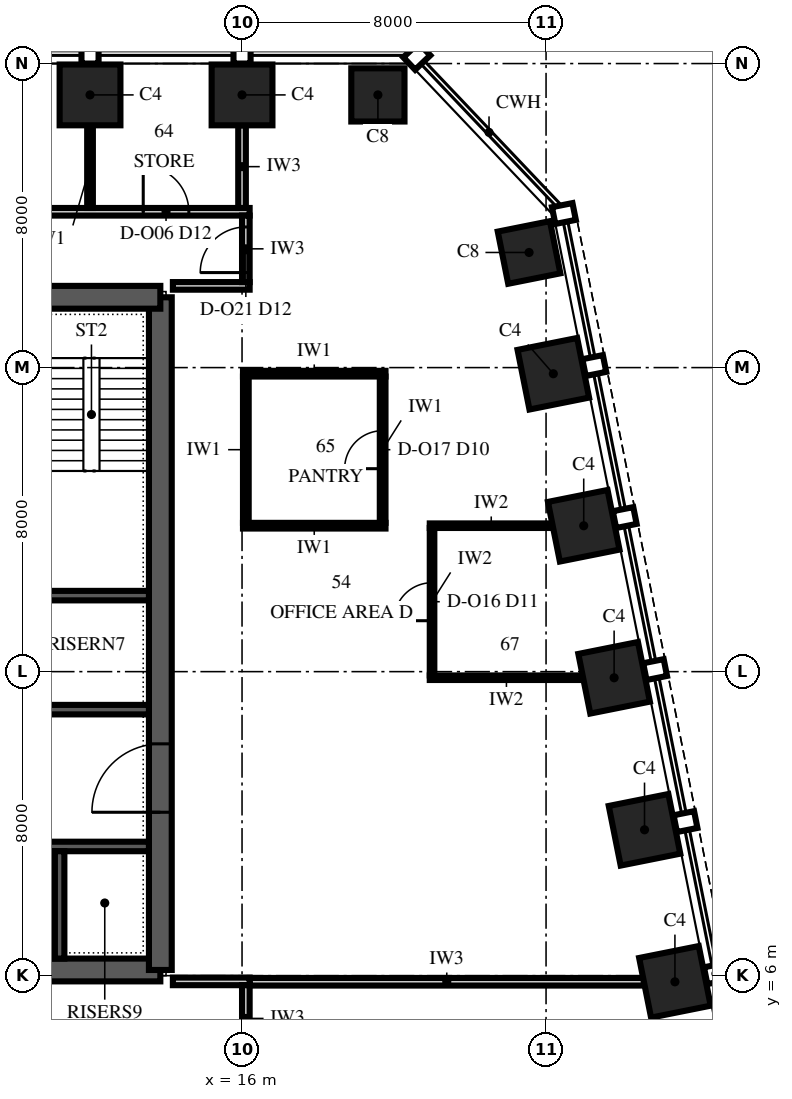
"""IFC4 building model, lengths in metres.
Left out: names, types, materials, properties, quantities, classifications, styles, units other than length and angle.
Written with IfcOpenShell. Run it as: python <this file> out.ifc"""

import sys

from ifc_helpers import new_model, si_unit, direction, frame, frame_2d, origin, origin_2d, place, context, subcontext, project, spatial, polyline, rectangle, outline, extrude, element, fill, save


model = new_model("IFC4")
c1 = context("Model", 3, precision=1e-05, world=origin(), true_north=direction((0.0, 1.0)))
c2 = subcontext(c1, "Body", "Model", "MODEL_VIEW")
j1 = project(units=[si_unit("LENGTHUNIT", "METRE"), si_unit("PLANEANGLEUNIT", "RADIAN")], contexts=[c1])
p1 = place(None, origin())
s1 = spatial("IfcSite", under=j1, at=p1, CompositionType="ELEMENT")
p2 = place(p1, origin())
s2 = spatial("IfcBuilding", under=s1, at=p2, CompositionType="ELEMENT")
p3 = place(p2, frame((0.0, 0.0, 226.0)))
s3 = spatial("IfcBuildingStorey", under=s2, at=p3, CompositionType="ELEMENT", Elevation=226.0)
for number, where, z_axis, x_axis in (
    (1, (27.391, 5.838, 0.0), (0.0, 0.0, 1.0), (-0.196, 0.981, 0.0)),
    (2, (26.591, 9.838, 0.0), (0.0, 0.0, 1.0), (-0.196, 0.981, 0.0)),
    (3, (25.791, 13.838, 0.0), (0.0, 0.0, 1.0), (-0.196, 0.981, 0.0)),
    (4, (24.991, 17.838, 0.0), (0.0, 0.0, 1.0), (-0.196, 0.981, 0.0)),
    (5, (24.191, 21.838, 0.0), (0.0, 0.0, 1.0), (-0.196, 0.981, 0.0)),
):
    element("IfcColumn", number, at=place(p3, frame(where, z_axis=z_axis, x_axis=x_axis)), inside=s3, PredefinedType="COLUMN", context=c2, shape_type="SweptSolid", body=[
        extrude(rectangle(XDim=1.6, YDim=1.6, at=origin_2d()), origin(), (0.0, 0.0, 1.0), 4.0),
    ])
for number, where, z_axis, x_axis in (
    (6, (23.553, 25.029, 0.0), (0.0, 0.0, 1.0), (-0.196, 0.981, 0.0)),
    (7, (19.575, 29.175, 0.0), (0.0, 0.0, 1.0), (-1.0, 0.0, 0.0)),
):
    element("IfcColumn", number, at=place(p3, frame(where, z_axis=z_axis, x_axis=x_axis)), inside=s3, PredefinedType="COLUMN", context=c2, shape_type="SweptSolid", body=[
        extrude(rectangle(XDim=1.4, YDim=1.4, at=origin_2d()), origin(), (0.0, 0.0, 1.0), 4.0),
    ])
for number, where, z_axis, x_axis in (
    (8, (16.0, 29.175, 0.0), (0.0, 0.0, 1.0), (-1.0, 0.0, 0.0)),
    (9, (12.0, 29.175, 0.0), (0.0, 0.0, 1.0), (-1.0, 0.0, 0.0)),
):
    element("IfcColumn", number, at=place(p3, frame(where, z_axis=z_axis, x_axis=x_axis)), inside=s3, PredefinedType="COLUMN", context=c2, shape_type="SweptSolid", body=[
        extrude(rectangle(XDim=1.6, YDim=1.6, at=origin_2d()), origin(), (0.0, 0.0, 1.0), 4.0),
    ])
p4 = place(p3, frame((-13.85, 6.15, 0.0), z_axis=(0.0, 0.0, 1.0), x_axis=(1.0, 0.0, 0.0)))
e10 = element("IfcWall", 10, at=p4, inside=s3, PredefinedType="SHEAR", context=c2, shape_type="SweptSolid", body=[
    extrude(rectangle(XDim=27.7, YDim=0.6, at=frame_2d((13.85, 0.0))), origin(), (0.0, 0.0, 1.0), 4.0),
])
p5 = place(p3, frame((13.85, 6.15, 0.0), z_axis=(0.0, 0.0, 1.0), x_axis=(0.0, 1.0, 0.0)))
e11 = element("IfcWall", 11, at=p5, inside=s3, PredefinedType="SHEAR", context=c2, shape_type="SweptSolid", body=[
    extrude(outline(polyline([(0.0, -0.3), (17.7, -0.3), (17.7, 0.0), (17.4, 0.0), (17.4, 0.3), (0.3, 0.3), (0.3, 0.0), (0.0, 0.0), (0.0, -0.3)])), origin(), (0.0, 0.0, 1.0), 4.0),
])
p6 = place(p5, frame((4.15, 0.0, 0.0)))
e12 = element("IfcOpeningElement", 12, at=p6, cuts=e11, PredefinedType="OPENING", context=c2, shape_type="SweptSolid", body=[
    extrude(rectangle(XDim=1.8, YDim=2.4, at=frame_2d((0.9, 1.2))), frame((0.0, 0.315, 0.0), z_axis=(0.0, -1.0, 0.0), x_axis=(1.0, 0.0, 0.0)), (0.0, 0.0, 1.0), 0.63),
])
p7 = place(p3, frame((13.85, 23.85, 0.0), z_axis=(0.0, 0.0, 1.0), x_axis=(-1.0, 0.0, 0.0)))
e13 = element("IfcWall", 13, at=p7, inside=s3, PredefinedType="SHEAR", context=c2, shape_type="SweptSolid", body=[
    extrude(rectangle(XDim=27.7, YDim=0.6, at=frame_2d((13.85, 0.0))), origin(), (0.0, 0.0, 1.0), 4.0),
])
p8 = place(p7, frame((21.75, 0.0, 0.0)))
e14 = element("IfcOpeningElement", 14, at=p8, cuts=e13, PredefinedType="OPENING", context=c2, shape_type="SweptSolid", body=[
    extrude(rectangle(XDim=1.0, YDim=2.1, at=frame_2d((0.5, 1.05))), frame((0.0, 0.315, 0.0), z_axis=(0.0, -1.0, 0.0), x_axis=(1.0, 0.0, 0.0)), (0.0, 0.0, 1.0), 0.63),
])
p9 = place(p7, frame((4.95, 0.0, 0.0)))
e15 = element("IfcOpeningElement", 15, at=p9, cuts=e13, PredefinedType="OPENING", context=c2, shape_type="SweptSolid", body=[
    extrude(rectangle(XDim=1.0, YDim=2.1, at=frame_2d((0.5, 1.05))), frame((0.0, 0.315, 0.0), z_axis=(0.0, -1.0, 0.0), x_axis=(1.0, 0.0, 0.0)), (0.0, 0.0, 1.0), 0.63),
])
p10 = place(p7, frame((17.35, 0.0, 0.0)))
e16 = element("IfcOpeningElement", 16, at=p10, cuts=e13, PredefinedType="OPENING", context=c2, shape_type="SweptSolid", body=[
    extrude(rectangle(XDim=1.0, YDim=2.1, at=frame_2d((0.5, 1.05))), frame((0.0, 0.315, 0.0), z_axis=(0.0, -1.0, 0.0), x_axis=(1.0, 0.0, 0.0)), (0.0, 0.0, 1.0), 0.63),
])
p11 = place(p7, frame((13.35, 0.0, 0.0)))
e17 = element("IfcOpeningElement", 17, at=p11, cuts=e13, PredefinedType="OPENING", context=c2, shape_type="SweptSolid", body=[
    extrude(rectangle(XDim=1.0, YDim=2.1, at=frame_2d((0.5, 1.05))), frame((0.0, 0.315, 0.0), z_axis=(0.0, -1.0, 0.0), x_axis=(1.0, 0.0, 0.0)), (0.0, 0.0, 1.0), 0.63),
])
p12 = place(p7, frame((9.35, 0.0, 0.0)))
e18 = element("IfcOpeningElement", 18, at=p12, cuts=e13, PredefinedType="OPENING", context=c2, shape_type="SweptSolid", body=[
    extrude(rectangle(XDim=1.0, YDim=2.1, at=frame_2d((0.5, 1.05))), frame((0.0, 0.315, 0.0), z_axis=(0.0, -1.0, 0.0), x_axis=(1.0, 0.0, 0.0)), (0.0, 0.0, 1.0), 0.63),
])
p13 = place(p3, frame((-13.55, 9.4, 0.0), z_axis=(0.0, 0.0, 1.0), x_axis=(1.0, 0.0, 0.0)))
e19 = element("IfcWall", 19, at=p13, inside=s3, PredefinedType="SHEAR", context=c2, shape_type="SweptSolid", body=[
    extrude(rectangle(XDim=27.1, YDim=0.25, at=frame_2d((13.55, 0.0))), origin(), (0.0, 0.0, 1.0), 4.0),
])
p14 = place(p13, frame((0.4, 0.0, 0.0)))
e20 = element("IfcOpeningElement", 20, at=p14, cuts=e19, PredefinedType="OPENING", context=c2, shape_type="SweptSolid", body=[
    extrude(rectangle(XDim=1.1, YDim=2.1, at=frame_2d((0.55, 1.05))), frame((0.0, 0.14, 0.0), z_axis=(0.0, -1.0, 0.0), x_axis=(1.0, 0.0, 0.0)), (0.0, 0.0, 1.0), 0.28),
])
p15 = place(p13, frame((3.2, 0.0, 0.0)))
e21 = element("IfcOpeningElement", 21, at=p15, cuts=e19, PredefinedType="OPENING", context=c2, shape_type="SweptSolid", body=[
    extrude(rectangle(XDim=1.1, YDim=2.1, at=frame_2d((0.55, 1.05))), frame((0.0, 0.14, 0.0), z_axis=(0.0, -1.0, 0.0), x_axis=(1.0, 0.0, 0.0)), (0.0, 0.0, 1.0), 0.28),
])
p16 = place(p13, frame((6.0, 0.0, 0.0)))
e22 = element("IfcOpeningElement", 22, at=p16, cuts=e19, PredefinedType="OPENING", context=c2, shape_type="SweptSolid", body=[
    extrude(rectangle(XDim=1.1, YDim=2.1, at=frame_2d((0.55, 1.05))), frame((0.0, 0.14, 0.0), z_axis=(0.0, -1.0, 0.0), x_axis=(1.0, 0.0, 0.0)), (0.0, 0.0, 1.0), 0.28),
])
p17 = place(p13, frame((17.3, 0.0, 0.0)))
e23 = element("IfcOpeningElement", 23, at=p17, cuts=e19, PredefinedType="OPENING", context=c2, shape_type="SweptSolid", body=[
    extrude(rectangle(XDim=0.9, YDim=2.1, at=frame_2d((0.45, 1.05))), frame((0.0, 0.14, 0.0), z_axis=(0.0, -1.0, 0.0), x_axis=(1.0, 0.0, 0.0)), (0.0, 0.0, 1.0), 0.28),
])
p18 = place(p13, frame((20.1, 0.0, 0.0)))
e24 = element("IfcOpeningElement", 24, at=p18, cuts=e19, PredefinedType="OPENING", context=c2, shape_type="SweptSolid", body=[
    extrude(rectangle(XDim=0.9, YDim=2.1, at=frame_2d((0.45, 1.05))), frame((0.0, 0.14, 0.0), z_axis=(0.0, -1.0, 0.0), x_axis=(1.0, 0.0, 0.0)), (0.0, 0.0, 1.0), 0.28),
])
p19 = place(p13, frame((22.9, 0.0, 0.0)))
e25 = element("IfcOpeningElement", 25, at=p19, cuts=e19, PredefinedType="OPENING", context=c2, shape_type="SweptSolid", body=[
    extrude(rectangle(XDim=0.9, YDim=2.1, at=frame_2d((0.45, 1.05))), frame((0.0, 0.14, 0.0), z_axis=(0.0, -1.0, 0.0), x_axis=(1.0, 0.0, 0.0)), (0.0, 0.0, 1.0), 0.28),
])
p20 = place(p3, frame((-13.55, 13.0, 0.0), z_axis=(0.0, 0.0, 1.0), x_axis=(1.0, 0.0, 0.0)))
e26 = element("IfcWall", 26, at=p20, inside=s3, PredefinedType="SHEAR", context=c2, shape_type="SweptSolid", body=[
    extrude(rectangle(XDim=27.1, YDim=0.25, at=frame_2d((13.55, 0.0))), origin(), (0.0, 0.0, 1.0), 4.0),
])
p21 = place(p20, frame((0.4, 0.0, 0.0)))
e27 = element("IfcOpeningElement", 27, at=p21, cuts=e26, PredefinedType="OPENING", context=c2, shape_type="SweptSolid", body=[
    extrude(rectangle(XDim=1.1, YDim=2.1, at=frame_2d((0.55, 1.05))), frame((0.0, 0.14, 0.0), z_axis=(0.0, -1.0, 0.0), x_axis=(1.0, 0.0, 0.0)), (0.0, 0.0, 1.0), 0.28),
])
p22 = place(p20, frame((3.2, 0.0, 0.0)))
e28 = element("IfcOpeningElement", 28, at=p22, cuts=e26, PredefinedType="OPENING", context=c2, shape_type="SweptSolid", body=[
    extrude(rectangle(XDim=1.1, YDim=2.1, at=frame_2d((0.55, 1.05))), frame((0.0, 0.14, 0.0), z_axis=(0.0, -1.0, 0.0), x_axis=(1.0, 0.0, 0.0)), (0.0, 0.0, 1.0), 0.28),
])
p23 = place(p20, frame((6.0, 0.0, 0.0)))
e29 = element("IfcOpeningElement", 29, at=p23, cuts=e26, PredefinedType="OPENING", context=c2, shape_type="SweptSolid", body=[
    extrude(rectangle(XDim=1.1, YDim=2.1, at=frame_2d((0.55, 1.05))), frame((0.0, 0.14, 0.0), z_axis=(0.0, -1.0, 0.0), x_axis=(1.0, 0.0, 0.0)), (0.0, 0.0, 1.0), 0.28),
])
p24 = place(p20, frame((15.7, 0.0, 0.0)))
e30 = element("IfcOpeningElement", 30, at=p24, cuts=e26, PredefinedType="OPENING", context=c2, shape_type="SweptSolid", body=[
    extrude(rectangle(XDim=0.9, YDim=2.1, at=frame_2d((0.45, 1.05))), frame((0.0, 0.14, 0.0), z_axis=(0.0, -1.0, 0.0), x_axis=(1.0, 0.0, 0.0)), (0.0, 0.0, 1.0), 0.28),
])
p25 = place(p20, frame((18.1, 0.0, 0.0)))
e31 = element("IfcOpeningElement", 31, at=p25, cuts=e26, PredefinedType="OPENING", context=c2, shape_type="SweptSolid", body=[
    extrude(rectangle(XDim=0.9, YDim=2.1, at=frame_2d((0.45, 1.05))), frame((0.0, 0.14, 0.0), z_axis=(0.0, -1.0, 0.0), x_axis=(1.0, 0.0, 0.0)), (0.0, 0.0, 1.0), 0.28),
])
p26 = place(p20, frame((21.1, 0.0, 0.0)))
e32 = element("IfcOpeningElement", 32, at=p26, cuts=e26, PredefinedType="OPENING", context=c2, shape_type="SweptSolid", body=[
    extrude(rectangle(XDim=0.9, YDim=2.1, at=frame_2d((0.45, 1.05))), frame((0.0, 0.14, 0.0), z_axis=(0.0, -1.0, 0.0), x_axis=(1.0, 0.0, 0.0)), (0.0, 0.0, 1.0), 0.28),
])
p27 = place(p3, frame((-13.55, 16.0, 0.0), z_axis=(0.0, 0.0, 1.0), x_axis=(1.0, 0.0, 0.0)))
e33 = element("IfcWall", 33, at=p27, inside=s3, PredefinedType="SHEAR", context=c2, shape_type="SweptSolid", body=[
    extrude(rectangle(XDim=27.1, YDim=0.25, at=frame_2d((13.55, 0.0))), origin(), (0.0, 0.0, 1.0), 4.0),
])
p28 = place(p3, frame((11.2, 6.45, 0.0), z_axis=(0.0, 0.0, 1.0), x_axis=(0.0, 1.0, 0.0)))
e34 = element("IfcWall", 34, at=p28, inside=s3, PredefinedType="SHEAR", context=c2, shape_type="SweptSolid", body=[
    extrude(rectangle(XDim=2.825, YDim=0.25, at=frame_2d((1.413, 0.0))), origin(), (0.0, 0.0, 1.0), 4.0),
])
p29 = place(p3, frame((16.2, 5.84, 0.0), z_axis=(0.0, 0.0, 1.0), x_axis=(1.0, 0.0, 0.0)))
e35 = element("IfcWall", 35, at=p29, inside=s3, PredefinedType="PARTITIONING", context=c2, shape_type="SweptSolid", body=[
    extrude(rectangle(XDim=10.375, YDim=0.2, at=frame_2d((5.188, 0.0))), origin(), (0.0, 0.0, 1.0), 2.842),
])
p30 = place(p3, frame((14.18, 5.85, 0.0), z_axis=(0.0, 0.0, 1.0), x_axis=(1.0, 0.0, 0.0)))
e36 = element("IfcWall", 36, at=p30, inside=s3, PredefinedType="PARTITIONING", context=c2, shape_type="SweptSolid", body=[
    extrude(rectangle(XDim=2.02, YDim=0.2, at=frame_2d((1.01, 0.0))), origin(), (0.0, 0.0, 1.0), 3.85),
])
p31 = place(p3, frame((20.94, 13.84, 0.0), z_axis=(0.0, 0.0, 1.0), x_axis=(1.0, 0.0, 0.0)))
e37 = element("IfcWall", 37, at=p31, inside=s3, PredefinedType="PARTITIONING", context=c2, shape_type="SweptSolid", body=[
    extrude(rectangle(XDim=4.035, YDim=0.12, at=frame_2d((2.018, 0.0))), origin(), (0.0, 0.0, 1.0), 3.25),
])
p32 = place(p3, frame((16.025, 17.84, 0.0), z_axis=(0.0, 0.0, 1.0), x_axis=(1.0, 0.0, 0.0)))
e38 = element("IfcWall", 38, at=p32, inside=s3, PredefinedType="PARTITIONING", context=c2, shape_type="SweptSolid", body=[
    extrude(rectangle(XDim=3.75, YDim=0.15, at=frame_2d((1.875, 0.0))), origin(), (0.0, 0.0, 1.0), 3.25),
])
p33 = place(p3, frame((20.94, 17.84, 0.0), z_axis=(0.0, 0.0, 1.0), x_axis=(1.0, 0.0, 0.0)))
e39 = element("IfcWall", 39, at=p33, inside=s3, PredefinedType="PARTITIONING", context=c2, shape_type="SweptSolid", body=[
    extrude(rectangle(XDim=3.235, YDim=0.12, at=frame_2d((1.617, 0.0))), origin(), (0.0, 0.0, 1.0), 3.25),
])
p34 = place(p3, frame((16.025, 21.84, 0.0), z_axis=(0.0, 0.0, 1.0), x_axis=(1.0, 0.0, 0.0)))
e40 = element("IfcWall", 40, at=p34, inside=s3, PredefinedType="PARTITIONING", context=c2, shape_type="SweptSolid", body=[
    extrude(rectangle(XDim=3.75, YDim=0.15, at=frame_2d((1.875, 0.0))), origin(), (0.0, 0.0, 1.0), 3.4),
])
p35 = place(p3, frame((14.18, 24.15, 0.0), z_axis=(0.0, 0.0, 1.0), x_axis=(1.0, 0.0, 0.0)))
e41 = element("IfcWall", 41, at=p35, inside=s3, PredefinedType="PARTITIONING", context=c2, shape_type="SweptSolid", body=[
    extrude(rectangle(XDim=2.02, YDim=0.2, at=frame_2d((1.01, 0.0))), origin(), (0.0, 0.0, 1.0), 3.4),
])
p36 = place(p3, frame((-16.2, 26.1, 0.0), z_axis=(0.0, 0.0, 1.0), x_axis=(1.0, 0.0, 0.0)))
e42 = element("IfcWall", 42, at=p36, inside=s3, PredefinedType="PARTITIONING", context=c2, shape_type="SweptSolid", body=[
    extrude(rectangle(XDim=32.4, YDim=0.2, at=frame_2d((16.2, 0.0))), origin(), (0.0, 0.0, 1.0), 3.4),
])
p37 = place(p36, frame((3.6, 0.0, 0.0)))
e43 = element("IfcOpeningElement", 43, at=p37, cuts=e42, PredefinedType="OPENING", context=c2, shape_type="SweptSolid", body=[
    extrude(rectangle(XDim=1.2, YDim=2.4, at=frame_2d((0.6, 1.2))), frame((0.0, 0.115, 0.0), z_axis=(0.0, -1.0, 0.0), x_axis=(1.0, 0.0, 0.0)), (0.0, 0.0, 1.0), 0.23),
])
p38 = place(p36, frame((9.6, 0.0, 0.0)))
e44 = element("IfcOpeningElement", 44, at=p38, cuts=e42, PredefinedType="OPENING", context=c2, shape_type="SweptSolid", body=[
    extrude(rectangle(XDim=1.2, YDim=2.4, at=frame_2d((0.6, 1.2))), frame((0.0, 0.115, 0.0), z_axis=(0.0, -1.0, 0.0), x_axis=(1.0, 0.0, 0.0)), (0.0, 0.0, 1.0), 0.23),
])
p39 = place(p36, frame((13.6, 0.0, 0.0)))
e45 = element("IfcOpeningElement", 45, at=p39, cuts=e42, PredefinedType="OPENING", context=c2, shape_type="SweptSolid", body=[
    extrude(rectangle(XDim=1.2, YDim=2.4, at=frame_2d((0.6, 1.2))), frame((0.0, 0.115, 0.0), z_axis=(0.0, -1.0, 0.0), x_axis=(1.0, 0.0, 0.0)), (0.0, 0.0, 1.0), 0.23),
])
p40 = place(p36, frame((17.6, 0.0, 0.0)))
e46 = element("IfcOpeningElement", 46, at=p40, cuts=e42, PredefinedType="OPENING", context=c2, shape_type="SweptSolid", body=[
    extrude(rectangle(XDim=1.2, YDim=2.4, at=frame_2d((0.6, 1.2))), frame((0.0, 0.115, 0.0), z_axis=(0.0, -1.0, 0.0), x_axis=(1.0, 0.0, 0.0)), (0.0, 0.0, 1.0), 0.23),
])
p41 = place(p36, frame((23.6, 0.0, 0.0)))
e47 = element("IfcOpeningElement", 47, at=p41, cuts=e42, PredefinedType="OPENING", context=c2, shape_type="SweptSolid", body=[
    extrude(rectangle(XDim=1.2, YDim=2.4, at=frame_2d((0.6, 1.2))), frame((0.0, 0.115, 0.0), z_axis=(0.0, -1.0, 0.0), x_axis=(1.0, 0.0, 0.0)), (0.0, 0.0, 1.0), 0.23),
])
p42 = place(p36, frame((29.6, 0.0, 0.0)))
e48 = element("IfcOpeningElement", 48, at=p42, cuts=e42, PredefinedType="OPENING", context=c2, shape_type="SweptSolid", body=[
    extrude(rectangle(XDim=1.2, YDim=2.4, at=frame_2d((0.6, 1.2))), frame((0.0, 0.115, 0.0), z_axis=(0.0, -1.0, 0.0), x_axis=(1.0, 0.0, 0.0)), (0.0, 0.0, 1.0), 0.23),
])
p43 = place(p3, frame((12.0, 26.2, 0.0), z_axis=(0.0, 0.0, 1.0), x_axis=(0.0, 1.0, 0.0)))
e49 = element("IfcWall", 49, at=p43, inside=s3, PredefinedType="PARTITIONING", context=c2, shape_type="SweptSolid", body=[
    extrude(rectangle(XDim=2.175, YDim=0.15, at=frame_2d((1.087, 0.0))), origin(), (0.0, 0.0, 1.0), 3.4),
])
p44 = place(p3, frame((16.0, 26.2, 0.0), z_axis=(0.0, 0.0, 1.0), x_axis=(0.0, 1.0, 0.0)))
e50 = element("IfcWall", 50, at=p44, inside=s3, PredefinedType="PARTITIONING", context=c2, shape_type="SweptSolid", body=[
    extrude(rectangle(XDim=2.175, YDim=0.2, at=frame_2d((1.087, 0.0))), origin(), (0.0, 0.0, 1.0), 3.4),
])
p45 = place(p3, frame((16.1, 4.0, 0.0), z_axis=(0.0, 0.0, 1.0), x_axis=(0.0, 1.0, 0.0)))
e51 = element("IfcWall", 51, at=p45, inside=s3, PredefinedType="PARTITIONING", context=c2, shape_type="SweptSolid", body=[
    extrude(rectangle(XDim=1.75, YDim=0.2, at=frame_2d((0.875, 0.0))), origin(), (0.0, 0.0, 1.0), 3.85),
])
p46 = place(p3, frame((16.1, 17.915, 0.0), z_axis=(0.0, 0.0, 1.0), x_axis=(0.0, 1.0, 0.0)))
e52 = element("IfcWall", 52, at=p46, inside=s3, PredefinedType="PARTITIONING", context=c2, shape_type="SweptSolid", body=[
    extrude(rectangle(XDim=3.85, YDim=0.15, at=frame_2d((1.925, 0.0))), origin(), (0.0, 0.0, 1.0), 3.25),
])
p47 = place(p3, frame((16.1, 24.25, 0.0), z_axis=(0.0, 0.0, 1.0), x_axis=(0.0, 1.0, 0.0)))
e53 = element("IfcWall", 53, at=p47, inside=s3, PredefinedType="PARTITIONING", context=c2, shape_type="SweptSolid", body=[
    extrude(rectangle(XDim=1.75, YDim=0.2, at=frame_2d((0.875, 0.0))), origin(), (0.0, 0.0, 1.0), 3.4),
])
p48 = place(p47, frame((0.25, 0.0, 0.0)))
e54 = element("IfcOpeningElement", 54, at=p48, cuts=e53, PredefinedType="OPENING", context=c2, shape_type="SweptSolid", body=[
    extrude(rectangle(XDim=1.2, YDim=2.4, at=frame_2d((0.6, 1.2))), frame((0.0, 0.115, 0.0), z_axis=(0.0, -1.0, 0.0), x_axis=(1.0, 0.0, 0.0)), (0.0, 0.0, 1.0), 0.23),
])
p49 = place(p3, frame((19.7, 17.915, 0.0), z_axis=(0.0, 0.0, 1.0), x_axis=(0.0, 1.0, 0.0)))
e55 = element("IfcWall", 55, at=p49, inside=s3, PredefinedType="PARTITIONING", context=c2, shape_type="SweptSolid", body=[
    extrude(rectangle(XDim=3.85, YDim=0.15, at=frame_2d((1.925, 0.0))), origin(), (0.0, 0.0, 1.0), 3.25),
])
p50 = place(p49, frame((1.425, 0.0, 0.0)))
e56 = element("IfcOpeningElement", 56, at=p50, cuts=e55, PredefinedType="OPENING", context=c2, shape_type="SweptSolid", body=[
    extrude(rectangle(XDim=1.0, YDim=2.3, at=frame_2d((0.5, 1.15))), frame((0.0, 0.09, 0.0), z_axis=(0.0, -1.0, 0.0), x_axis=(1.0, 0.0, 0.0)), (0.0, 0.0, 1.0), 0.18),
])
p51 = place(p3, frame((21.0, 13.9, 0.0), z_axis=(0.0, 0.0, 1.0), x_axis=(0.0, 1.0, 0.0)))
e57 = element("IfcWall", 57, at=p51, inside=s3, PredefinedType="PARTITIONING", context=c2, shape_type="SweptSolid", body=[
    extrude(rectangle(XDim=3.88, YDim=0.12, at=frame_2d((1.94, 0.0))), origin(), (0.0, 0.0, 1.0), 3.25),
])
p52 = place(p51, frame((1.44, 0.0, 0.0)))
e58 = element("IfcOpeningElement", 58, at=p52, cuts=e57, PredefinedType="OPENING", context=c2, shape_type="SweptSolid", body=[
    extrude(rectangle(XDim=1.0, YDim=2.4, at=frame_2d((0.5, 1.2))), frame((0.0, 0.075, 0.0), z_axis=(0.0, -1.0, 0.0), x_axis=(1.0, 0.0, 0.0)), (0.0, 0.0, 1.0), 0.15),
])
p53 = place(p6, origin())
e59 = element("IfcDoor", 59, at=p53, inside=s3, OperationType="DOUBLE_DOOR_SINGLE_SWING", PredefinedType="DOOR", context=c2, shape_type="SweptSolid", body=[
    extrude(rectangle(XDim=1.8, YDim=2.4, at=frame_2d((0.9, 1.2))), frame((0.0, 0.3, 0.0), z_axis=(0.0, -1.0, 0.0), x_axis=(1.0, 0.0, 0.0)), (0.0, 0.0, 1.0), 0.6),
])
fill(e12, e59)
p54 = place(p42, origin())
e60 = element("IfcDoor", 60, at=p54, inside=s3, OperationType="SINGLE_SWING_LEFT", PredefinedType="DOOR", context=c2, shape_type="SweptSolid", body=[
    extrude(rectangle(XDim=1.2, YDim=2.4, at=frame_2d((0.6, 1.2))), frame((0.0, 0.1, 0.0), z_axis=(0.0, -1.0, 0.0), x_axis=(1.0, 0.0, 0.0)), (0.0, 0.0, 1.0), 0.199),
])
fill(e48, e60)
p55 = place(p52, origin())
e61 = element("IfcDoor", 61, at=p55, inside=s3, OperationType="SINGLE_SWING_RIGHT", PredefinedType="DOOR", context=c2, shape_type="SweptSolid", body=[
    extrude(rectangle(XDim=1.0, YDim=2.4, at=frame_2d((0.5, 1.2))), frame((0.0, 0.06, 0.0), z_axis=(0.0, -1.0, 0.0), x_axis=(1.0, 0.0, 0.0)), (0.0, 0.0, 1.0), 0.12),
])
fill(e58, e61)
p56 = place(p50, origin())
e62 = element("IfcDoor", 62, at=p56, inside=s3, OperationType="SINGLE_SWING_LEFT", PredefinedType="DOOR", context=c2, shape_type="SweptSolid", body=[
    extrude(rectangle(XDim=1.0, YDim=2.3, at=frame_2d((0.5, 1.15))), frame((0.0, 0.075, 0.0), z_axis=(0.0, -1.0, 0.0), x_axis=(1.0, 0.0, 0.0)), (0.0, 0.0, 1.0), 0.149),
])
fill(e56, e62)
p57 = place(p48, origin())
e63 = element("IfcDoor", 63, at=p57, inside=s3, OperationType="SINGLE_SWING_LEFT", PredefinedType="DOOR", context=c2, shape_type="SweptSolid", body=[
    extrude(rectangle(XDim=1.2, YDim=2.4, at=frame_2d((0.6, 1.2))), frame((0.0, 0.1, 0.0), z_axis=(0.0, -1.0, 0.0), x_axis=(1.0, 0.0, 0.0)), (0.0, 0.0, 1.0), 0.199),
])
fill(e54, e63)
save(model, sys.argv[1])
